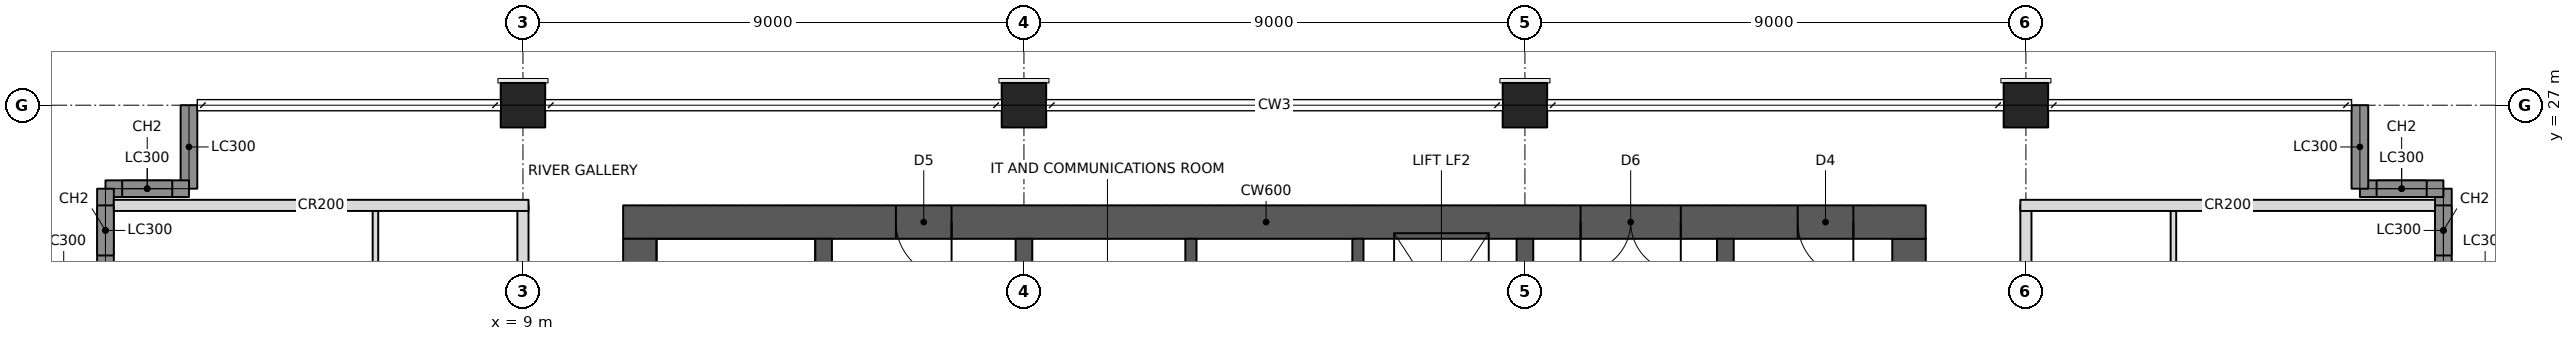
"""IFC4 building model, lengths in metres.
Left out: names, types, materials, properties, quantities, classifications, styles, units other than length and angle.
Written with IfcOpenShell. Run it as: python <this file> out.ifc"""

import sys

from ifc_helpers import new_model, si_unit, direction, frame, frame_2d, origin, origin_2d, place, context, subcontext, project, spatial, rectangle, hollow_rectangle, extrude, element, fill, save


model = new_model("IFC4")
c1 = context("Model", 3, precision=1e-05, world=origin(), true_north=direction((0.0, 1.0)))
c2 = subcontext(c1, "Body", "Model", "MODEL_VIEW")
j1 = project(units=[si_unit("LENGTHUNIT", "METRE"), si_unit("PLANEANGLEUNIT", "RADIAN")], contexts=[c1])
p1 = place(None, origin())
s1 = spatial("IfcSite", under=j1, at=p1, CompositionType="ELEMENT")
p2 = place(p1, origin())
s2 = spatial("IfcBuilding", under=s1, at=p2, CompositionType="ELEMENT")
p3 = place(p2, frame((0.0, 0.0, 174.0)))
s3 = spatial("IfcBuildingStorey", under=s2, at=p3, CompositionType="ELEMENT", Elevation=174.0)
for number, where, z_axis, x_axis in (
    (1, (9.0, 27.0, 0.0), (0.0, 0.0, 1.0), (1.0, 0.0, 0.0)),
    (2, (18.0, 27.0, 0.0), (0.0, 0.0, 1.0), (1.0, 0.0, 0.0)),
    (3, (27.0, 27.0, 0.0), (0.0, 0.0, 1.0), (1.0, 0.0, 0.0)),
    (4, (36.0, 27.0, 0.0), (0.0, 0.0, 1.0), (1.0, 0.0, 0.0)),
):
    element("IfcColumn", number, at=place(p3, frame(where, z_axis=z_axis, x_axis=x_axis)), inside=s3, PredefinedType="COLUMN", context=c2, shape_type="SweptSolid", body=[
        extrude(hollow_rectangle(XDim=0.8, YDim=0.8, WallThickness=0.07, at=origin_2d()), origin(), (0.0, 0.0, 1.0), 3.4),
    ])
p4 = place(p3, frame((10.8, 24.9, 0.0), z_axis=(0.0, 0.0, 1.0), x_axis=(1.0, 0.0, 0.0)))
e5 = element("IfcWall", 5, at=p4, inside=s3, PredefinedType="SHEAR", context=c2, shape_type="SweptSolid", body=[
    extrude(rectangle(XDim=23.4, YDim=0.6, at=frame_2d((11.7, 0.0))), origin(), (0.0, 0.0, 1.0), 3.4),
])
p5 = place(p4, frame((17.2, 0.0, 0.0)))
e6 = element("IfcOpeningElement", 6, at=p5, cuts=e5, PredefinedType="OPENING", context=c2, shape_type="SweptSolid", body=[
    extrude(rectangle(XDim=1.8, YDim=2.1, at=frame_2d((0.9, 1.05))), frame((0.0, 0.31, 0.0), z_axis=(0.0, -1.0, 0.0), x_axis=(1.0, 0.0, 0.0)), (0.0, 0.0, 1.0), 0.62),
])
p6 = place(p4, frame((21.1, 0.0, 0.0)))
e7 = element("IfcOpeningElement", 7, at=p6, cuts=e5, PredefinedType="OPENING", context=c2, shape_type="SweptSolid", body=[
    extrude(rectangle(XDim=1.0, YDim=2.1, at=frame_2d((0.5, 1.05))), frame((0.0, 0.31, 0.0), z_axis=(0.0, -1.0, 0.0), x_axis=(1.0, 0.0, 0.0)), (0.0, 0.0, 1.0), 0.62),
])
p7 = place(p4, frame((4.9, 0.0, 0.0)))
e8 = element("IfcOpeningElement", 8, at=p7, cuts=e5, PredefinedType="OPENING", context=c2, shape_type="SweptSolid", body=[
    extrude(rectangle(XDim=1.0, YDim=2.1, at=frame_2d((0.5, 1.05))), frame((0.0, 0.31, 0.0), z_axis=(0.0, -1.0, 0.0), x_axis=(1.0, 0.0, 0.0)), (0.0, 0.0, 1.0), 0.62),
])
for number, where, z_axis, x_axis in (
    (9, (11.1, 11.4, 0.0), (0.0, 0.0, 1.0), (0.0, 1.0, 0.0)),
    (10, (33.9, 11.4, 0.0), (0.0, 0.0, 1.0), (0.0, 1.0, 0.0)),
):
    element("IfcWall", number, at=place(p3, frame(where, z_axis=z_axis, x_axis=x_axis)), inside=s3, PredefinedType="SHEAR", context=c2, shape_type="SweptSolid", body=[
        extrude(rectangle(XDim=13.2, YDim=0.6, at=frame_2d((6.6, 0.0))), origin(), (0.0, 0.0, 1.0), 3.4),
    ])
p8 = place(p3, frame((14.4, 11.4, 0.0), z_axis=(0.0, 0.0, 1.0), x_axis=(0.0, 1.0, 0.0)))
e11 = element("IfcWall", 11, at=p8, inside=s3, PredefinedType="SHEAR", context=c2, shape_type="SweptSolid", body=[
    extrude(rectangle(XDim=13.2, YDim=0.3, at=frame_2d((6.6, 0.0))), origin(), (0.0, 0.0, 1.0), 3.4),
])
p9 = place(p3, frame((18.0, 11.4, 0.0), z_axis=(0.0, 0.0, 1.0), x_axis=(0.0, 1.0, 0.0)))
e12 = element("IfcWall", 12, at=p9, inside=s3, PredefinedType="SHEAR", context=c2, shape_type="SweptSolid", body=[
    extrude(rectangle(XDim=13.2, YDim=0.3, at=frame_2d((6.6, 0.0))), origin(), (0.0, 0.0, 1.0), 3.4),
])
p10 = place(p9, frame((3.6, 0.0, 0.0)))
e13 = element("IfcOpeningElement", 13, at=p10, cuts=e12, PredefinedType="OPENING", context=c2, shape_type="SweptSolid", body=[
    extrude(rectangle(XDim=1.0, YDim=2.1, at=frame_2d((0.5, 1.05))), frame((0.0, 0.16, 0.0), z_axis=(0.0, -1.0, 0.0), x_axis=(1.0, 0.0, 0.0)), (0.0, 0.0, 1.0), 0.32),
])
p11 = place(p9, frame((7.85, 0.0, 0.0)))
e14 = element("IfcOpeningElement", 14, at=p11, cuts=e12, PredefinedType="OPENING", context=c2, shape_type="SweptSolid", body=[
    extrude(rectangle(XDim=1.1, YDim=2.1, at=frame_2d((0.55, 1.05))), frame((0.0, 0.16, 0.0), z_axis=(0.0, -1.0, 0.0), x_axis=(1.0, 0.0, 0.0)), (0.0, 0.0, 1.0), 0.32),
])
p12 = place(p3, frame((27.0, 21.75, 0.0), z_axis=(0.0, 0.0, 1.0), x_axis=(0.0, 1.0, 0.0)))
e15 = element("IfcWall", 15, at=p12, inside=s3, PredefinedType="SHEAR", context=c2, shape_type="SweptSolid", body=[
    extrude(rectangle(XDim=2.85, YDim=0.3, at=frame_2d((1.425, 0.0))), origin(), (0.0, 0.0, 1.0), 3.4),
])
for number, where, z_axis, x_axis in (
    (16, (21.0, 21.75, 0.0), (0.0, 0.0, 1.0), (0.0, 1.0, 0.0)),
    (17, (24.0, 21.75, 0.0), (0.0, 0.0, 1.0), (0.0, 1.0, 0.0)),
):
    element("IfcWall", number, at=place(p3, frame(where, z_axis=z_axis, x_axis=x_axis)), inside=s3, PredefinedType="SHEAR", context=c2, shape_type="SweptSolid", body=[
        extrude(rectangle(XDim=2.85, YDim=0.2, at=frame_2d((1.425, 0.0))), origin(), (0.0, 0.0, 1.0), 3.4),
    ])
p13 = place(p3, frame((30.6, 11.4, 0.0), z_axis=(0.0, 0.0, 1.0), x_axis=(0.0, 1.0, 0.0)))
e18 = element("IfcWall", 18, at=p13, inside=s3, PredefinedType="SHEAR", context=c2, shape_type="SweptSolid", body=[
    extrude(rectangle(XDim=13.2, YDim=0.3, at=frame_2d((6.6, 0.0))), origin(), (0.0, 0.0, 1.0), 3.4),
])
p14 = place(p3, frame((43.5, 24.0, 0.0), z_axis=(0.0, 0.0, 1.0), x_axis=(0.0, 1.0, 0.0)))
e19 = element("IfcWall", 19, at=p14, inside=s3, PredefinedType="SOLIDWALL", context=c2, shape_type="SweptSolid", body=[
    extrude(rectangle(XDim=1.5, YDim=0.3, at=frame_2d((0.75, 0.0))), origin(), (0.0, 0.0, 1.0), 3.2),
])
p15 = place(p14, frame((0.3, 0.0, 0.6)))
e20 = element("IfcOpeningElement", 20, at=p15, cuts=e19, PredefinedType="OPENING", context=c2, shape_type="SweptSolid", body=[
    extrude(rectangle(XDim=0.9, YDim=2.2, at=frame_2d((0.45, 1.1))), frame((0.0, 0.16, 0.0), z_axis=(0.0, -1.0, 0.0), x_axis=(1.0, 0.0, 0.0)), (0.0, 0.0, 1.0), 0.32),
])
p16 = place(p3, frame((43.5, 25.5, 0.0), z_axis=(0.0, 0.0, 1.0), x_axis=(-1.0, 0.0, 0.0)))
e21 = element("IfcWall", 21, at=p16, inside=s3, PredefinedType="SOLIDWALL", context=c2, shape_type="SweptSolid", body=[
    extrude(rectangle(XDim=1.5, YDim=0.3, at=frame_2d((0.75, 0.0))), origin(), (0.0, 0.0, 1.0), 3.2),
])
p17 = place(p16, frame((0.3, 0.0, 0.6)))
e22 = element("IfcOpeningElement", 22, at=p17, cuts=e21, PredefinedType="OPENING", context=c2, shape_type="SweptSolid", body=[
    extrude(rectangle(XDim=0.9, YDim=2.2, at=frame_2d((0.45, 1.1))), frame((0.0, 0.16, 0.0), z_axis=(0.0, -1.0, 0.0), x_axis=(1.0, 0.0, 0.0)), (0.0, 0.0, 1.0), 0.32),
])
for number, where, z_axis, x_axis in (
    (23, (42.0, 25.5, 0.0), (0.0, 0.0, 1.0), (0.0, 1.0, 0.0)),
    (24, (3.0, 27.0, 0.0), (0.0, 0.0, 1.0), (0.0, -1.0, 0.0)),
):
    element("IfcWall", number, at=place(p3, frame(where, z_axis=z_axis, x_axis=x_axis)), inside=s3, PredefinedType="SOLIDWALL", context=c2, shape_type="SweptSolid", body=[
        extrude(rectangle(XDim=1.5, YDim=0.3, at=frame_2d((0.75, 0.0))), origin(), (0.0, 0.0, 1.0), 2.42),
    ])
p18 = place(p3, frame((3.0, 25.5, 0.0), z_axis=(0.0, 0.0, 1.0), x_axis=(-1.0, 0.0, 0.0)))
e25 = element("IfcWall", 25, at=p18, inside=s3, PredefinedType="SOLIDWALL", context=c2, shape_type="SweptSolid", body=[
    extrude(rectangle(XDim=1.5, YDim=0.3, at=frame_2d((0.75, 0.0))), origin(), (0.0, 0.0, 1.0), 3.2),
])
p19 = place(p18, frame((0.3, 0.0, 0.6)))
e26 = element("IfcOpeningElement", 26, at=p19, cuts=e25, PredefinedType="OPENING", context=c2, shape_type="SweptSolid", body=[
    extrude(rectangle(XDim=0.9, YDim=2.2, at=frame_2d((0.45, 1.1))), frame((0.0, 0.16, 0.0), z_axis=(0.0, -1.0, 0.0), x_axis=(1.0, 0.0, 0.0)), (0.0, 0.0, 1.0), 0.32),
])
p20 = place(p3, frame((1.5, 25.5, 0.0), z_axis=(0.0, 0.0, 1.0), x_axis=(0.0, -1.0, 0.0)))
e27 = element("IfcWall", 27, at=p20, inside=s3, PredefinedType="SOLIDWALL", context=c2, shape_type="SweptSolid", body=[
    extrude(rectangle(XDim=1.5, YDim=0.3, at=frame_2d((0.75, 0.0))), origin(), (0.0, 0.0, 1.0), 3.2),
])
p21 = place(p20, frame((0.3, 0.0, 0.6)))
e28 = element("IfcOpeningElement", 28, at=p21, cuts=e27, PredefinedType="OPENING", context=c2, shape_type="SweptSolid", body=[
    extrude(rectangle(XDim=0.9, YDim=2.2, at=frame_2d((0.45, 1.1))), frame((0.0, 0.16, 0.0), z_axis=(0.0, -1.0, 0.0), x_axis=(1.0, 0.0, 0.0)), (0.0, 0.0, 1.0), 0.32),
])
p22 = place(p3, frame((9.0, 18.4, 0.0), z_axis=(0.0, 0.0, 1.0), x_axis=(0.0, 1.0, 0.0)))
e29 = element("IfcWall", 29, at=p22, inside=s3, PredefinedType="PARTITIONING", context=c2, shape_type="SweptSolid", body=[
    extrude(rectangle(XDim=6.8, YDim=0.2, at=frame_2d((3.4, 0.0))), origin(), (0.0, 0.0, 1.0), 2.405),
])
p23 = place(p3, frame((1.65, 25.2, 0.0), z_axis=(0.0, 0.0, 1.0), x_axis=(1.0, 0.0, 0.0)))
e30 = element("IfcWall", 30, at=p23, inside=s3, PredefinedType="PARTITIONING", context=c2, shape_type="SweptSolid", body=[
    extrude(rectangle(XDim=7.45, YDim=0.2, at=frame_2d((3.725, 0.0))), origin(), (0.0, 0.0, 1.0), 2.404),
])
p24 = place(p3, frame((36.0, 18.4, 0.0), z_axis=(0.0, 0.0, 1.0), x_axis=(0.0, 1.0, 0.0)))
e31 = element("IfcWall", 31, at=p24, inside=s3, PredefinedType="PARTITIONING", context=c2, shape_type="SweptSolid", body=[
    extrude(rectangle(XDim=6.8, YDim=0.2, at=frame_2d((3.4, 0.0))), origin(), (0.0, 0.0, 1.0), 2.405),
])
p25 = place(p3, frame((35.9, 25.2, 0.0), z_axis=(0.0, 0.0, 1.0), x_axis=(1.0, 0.0, 0.0)))
e32 = element("IfcWall", 32, at=p25, inside=s3, PredefinedType="PARTITIONING", context=c2, shape_type="SweptSolid", body=[
    extrude(rectangle(XDim=7.45, YDim=0.2, at=frame_2d((3.725, 0.0))), origin(), (0.0, 0.0, 1.0), 2.404),
])
for number, where, z_axis, x_axis in (
    (33, (6.35, 21.65, 0.0), (0.0, 0.0, 1.0), (0.0, 1.0, 0.0)),
    (34, (38.65, 21.65, 0.0), (0.0, 0.0, 1.0), (0.0, 1.0, 0.0)),
):
    element("IfcWall", number, at=place(p3, frame(where, z_axis=z_axis, x_axis=x_axis)), inside=s3, PredefinedType="PARTITIONING", context=c2, shape_type="SweptSolid", body=[
        extrude(rectangle(XDim=3.45, YDim=0.1, at=frame_2d((1.725, 0.0))), origin(), (0.0, 0.0, 1.0), 3.2),
    ])
p26 = place(p15, origin())
e35 = element("IfcWindow", 35, at=p26, inside=s3, PartitioningType="SINGLE_PANEL", PredefinedType="WINDOW", context=c2, shape_type="SweptSolid", body=[
    extrude(rectangle(XDim=0.9, YDim=2.2, at=frame_2d((0.45, 1.1))), frame((0.0, 0.03, 0.0), z_axis=(0.0, -1.0, 0.0), x_axis=(1.0, 0.0, 0.0)), (0.0, 0.0, 1.0), 0.06),
])
fill(e20, e35)
p27 = place(p17, origin())
e36 = element("IfcWindow", 36, at=p27, inside=s3, PartitioningType="SINGLE_PANEL", PredefinedType="WINDOW", context=c2, shape_type="SweptSolid", body=[
    extrude(rectangle(XDim=0.9, YDim=2.2, at=frame_2d((0.45, 1.1))), frame((0.0, 0.03, 0.0), z_axis=(0.0, -1.0, 0.0), x_axis=(1.0, 0.0, 0.0)), (0.0, 0.0, 1.0), 0.06),
])
fill(e22, e36)
p28 = place(p19, origin())
e37 = element("IfcWindow", 37, at=p28, inside=s3, PartitioningType="SINGLE_PANEL", PredefinedType="WINDOW", context=c2, shape_type="SweptSolid", body=[
    extrude(rectangle(XDim=0.9, YDim=2.2, at=frame_2d((0.45, 1.1))), frame((0.0, 0.03, 0.0), z_axis=(0.0, -1.0, 0.0), x_axis=(1.0, 0.0, 0.0)), (0.0, 0.0, 1.0), 0.06),
])
fill(e26, e37)
p29 = place(p21, origin())
e38 = element("IfcWindow", 38, at=p29, inside=s3, PartitioningType="SINGLE_PANEL", PredefinedType="WINDOW", context=c2, shape_type="SweptSolid", body=[
    extrude(rectangle(XDim=0.9, YDim=2.2, at=frame_2d((0.45, 1.1))), frame((0.0, 0.03, 0.0), z_axis=(0.0, -1.0, 0.0), x_axis=(1.0, 0.0, 0.0)), (0.0, 0.0, 1.0), 0.06),
])
fill(e28, e38)
p30 = place(p5, frame((1.8, 0.0, 0.0), z_axis=(0.0, 0.0, 1.0), x_axis=(-1.0, 0.0, 0.0)))
e39 = element("IfcDoor", 39, at=p30, inside=s3, OperationType="DOUBLE_DOOR_SINGLE_SWING", PredefinedType="DOOR", context=c2, shape_type="SweptSolid", body=[
    extrude(rectangle(XDim=1.8, YDim=2.1, at=frame_2d((0.9, 1.05))), frame((0.0, 0.025, 0.0), z_axis=(0.0, -1.0, 0.0), x_axis=(1.0, 0.0, 0.0)), (0.0, 0.0, 1.0), 0.05),
])
fill(e6, e39)
p31 = place(p6, frame((1.0, 0.0, 0.0), z_axis=(0.0, 0.0, 1.0), x_axis=(-1.0, 0.0, 0.0)))
e40 = element("IfcDoor", 40, at=p31, inside=s3, OperationType="SINGLE_SWING_LEFT", PredefinedType="DOOR", context=c2, shape_type="SweptSolid", body=[
    extrude(rectangle(XDim=1.0, YDim=2.1, at=frame_2d((0.5, 1.05))), frame((0.0, 0.025, 0.0), z_axis=(0.0, -1.0, 0.0), x_axis=(1.0, 0.0, 0.0)), (0.0, 0.0, 1.0), 0.05),
])
fill(e7, e40)
p32 = place(p7, frame((1.0, 0.0, 0.0), z_axis=(0.0, 0.0, 1.0), x_axis=(-1.0, 0.0, 0.0)))
e41 = element("IfcDoor", 41, at=p32, inside=s3, OperationType="SINGLE_SWING_LEFT", PredefinedType="DOOR", context=c2, shape_type="SweptSolid", body=[
    extrude(rectangle(XDim=1.0, YDim=2.1, at=frame_2d((0.5, 1.05))), frame((0.0, 0.025, 0.0), z_axis=(0.0, -1.0, 0.0), x_axis=(1.0, 0.0, 0.0)), (0.0, 0.0, 1.0), 0.05),
])
fill(e8, e41)
save(model, sys.argv[1])
